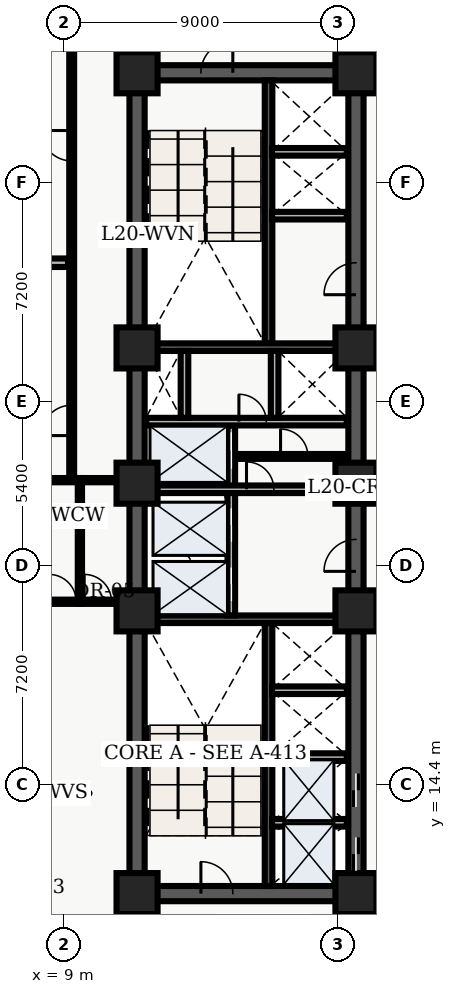
"""IFC4 building model, lengths in metres.
Left out: names, types, materials, properties, quantities, classifications, styles, units other than length and angle.
Written with IfcOpenShell. Run it as: python <this file> out.ifc"""

import sys

from ifc_helpers import new_model, entity, si_unit, converted_unit, direction, frame, origin_with_axes, origin_2d_with_axis, place, context, subcontext, project, spatial, polyline, rectangle, outline, extrude, element, fill, save


model = new_model("IFC4")
c1 = context("Model", 3, precision=1e-05, world=origin_with_axes(), true_north=direction((0.0, 1.0)))
c2 = subcontext(c1, "Body", "Model", "MODEL_VIEW")
j1 = project(units=[si_unit("LENGTHUNIT", "METRE"), converted_unit("PLANEANGLEUNIT", "DEGREE", entity("IfcPlaneAngleMeasure", 0.017), si_unit("PLANEANGLEUNIT", "RADIAN"), dimensions=[0, 0, 0, 0, 0, 0, 0])], contexts=[c1])
p1 = place(None, origin_with_axes())
s1 = spatial("IfcSite", under=j1, at=p1, CompositionType="ELEMENT")
p2 = place(p1, origin_with_axes())
s2 = spatial("IfcBuilding", under=s1, at=p2, CompositionType="ELEMENT")
p3 = place(p2, frame((0.0, 0.0, 84.6), z_axis=(0.0, 0.0, 1.0), x_axis=(1.0, 0.0, 0.0)))
s3 = spatial("IfcBuildingStorey", under=s2, at=p3, CompositionType="ELEMENT", Elevation=84.6)
p4 = place(p3, frame((11.4, 10.8, 0.0), z_axis=(0.0, 0.0, 1.0), x_axis=(0.0, 1.0, 0.0)))
e1 = element("IfcWall", 1, at=p4, inside=s3, PredefinedType="SHEAR", context=c2, shape_type="SweptSolid", body=[
    extrude(outline(polyline([(0.0, -0.25), (27.0, -0.25), (27.0, 0.25), (0.0, 0.25), (0.0, -0.25)])), origin_with_axes(), (0.0, 0.0, 1.0), 4.26),
])
p5 = place(p3, frame((11.4, 10.8, 0.0), z_axis=(0.0, 0.0, 1.0), x_axis=(1.0, 0.0, 0.0)))
e2 = element("IfcWall", 2, at=p5, inside=s3, PredefinedType="SHEAR", context=c2, shape_type="SweptSolid", body=[
    extrude(outline(polyline([(0.0, -0.25), (7.2, -0.25), (7.2, 0.25), (0.0, 0.25), (0.0, -0.25)])), origin_with_axes(), (0.0, 0.0, 1.0), 4.26),
])
p6 = place(p5, frame((2.625, 0.0, 0.0), z_axis=(0.0, 0.0, 1.0), x_axis=(1.0, 0.0, 0.0)))
e3 = element("IfcOpeningElement", 3, at=p6, cuts=e2, PredefinedType="OPENING", context=c2, shape_type="SweptSolid", body=[
    extrude(rectangle(XDim=1.05, YDim=0.52, at=origin_2d_with_axis()), origin_with_axes(), (0.0, 0.0, 1.0), 2.15),
])
p7 = place(p3, frame((11.4, 37.8, 0.0), z_axis=(0.0, 0.0, 1.0), x_axis=(1.0, 0.0, 0.0)))
e4 = element("IfcWall", 4, at=p7, inside=s3, PredefinedType="SHEAR", context=c2, shape_type="SweptSolid", body=[
    extrude(outline(polyline([(0.0, -0.25), (7.2, -0.25), (7.2, 0.25), (0.0, 0.25), (0.0, -0.25)])), origin_with_axes(), (0.0, 0.0, 1.0), 4.26),
])
p8 = place(p7, frame((2.625, 0.0, 0.0), z_axis=(0.0, 0.0, 1.0), x_axis=(1.0, 0.0, 0.0)))
e5 = element("IfcOpeningElement", 5, at=p8, cuts=e4, PredefinedType="OPENING", context=c2, shape_type="SweptSolid", body=[
    extrude(rectangle(XDim=1.05, YDim=0.52, at=origin_2d_with_axis()), origin_with_axes(), (0.0, 0.0, 1.0), 2.15),
])
p9 = place(p3, frame((18.6, 10.8, 0.0), z_axis=(0.0, 0.0, 1.0), x_axis=(0.0, 1.0, 0.0)))
e6 = element("IfcWall", 6, at=p9, inside=s3, PredefinedType="SHEAR", context=c2, shape_type="SweptSolid", body=[
    extrude(outline(polyline([(0.0, -0.25), (13.5, -0.25), (13.5, 0.25), (0.0, 0.25), (0.0, -0.25)])), origin_with_axes(), (0.0, 0.0, 1.0), 4.26),
])
p10 = place(p9, frame((1.3, 0.0, 0.0), z_axis=(0.0, 0.0, 1.0), x_axis=(1.0, 0.0, 0.0)))
e7 = element("IfcOpeningElement", 7, at=p10, cuts=e6, PredefinedType="OPENING", context=c2, shape_type="SweptSolid", body=[
    extrude(rectangle(XDim=1.1, YDim=0.52, at=origin_2d_with_axis()), origin_with_axes(), (0.0, 0.0, 1.0), 2.15),
])
p11 = place(p9, frame((3.4, 0.0, 0.0), z_axis=(0.0, 0.0, 1.0), x_axis=(1.0, 0.0, 0.0)))
e8 = element("IfcOpeningElement", 8, at=p11, cuts=e6, PredefinedType="OPENING", context=c2, shape_type="SweptSolid", body=[
    extrude(rectangle(XDim=1.1, YDim=0.52, at=origin_2d_with_axis()), origin_with_axes(), (0.0, 0.0, 1.0), 2.15),
])
p12 = place(p9, frame((11.125, 0.0, 0.0), z_axis=(0.0, 0.0, 1.0), x_axis=(1.0, 0.0, 0.0)))
e9 = element("IfcOpeningElement", 9, at=p12, cuts=e6, PredefinedType="OPENING", context=c2, shape_type="SweptSolid", body=[
    extrude(rectangle(XDim=1.05, YDim=0.52, at=origin_2d_with_axis()), origin_with_axes(), (0.0, 0.0, 1.0), 2.15),
])
p13 = place(p3, frame((18.6, 24.3, 0.0), z_axis=(0.0, 0.0, 1.0), x_axis=(0.0, 1.0, 0.0)))
e10 = element("IfcWall", 10, at=p13, inside=s3, PredefinedType="SHEAR", context=c2, shape_type="SweptSolid", body=[
    extrude(outline(polyline([(0.0, -0.25), (13.5, -0.25), (13.5, 0.25), (0.0, 0.25), (0.0, -0.25)])), origin_with_axes(), (0.0, 0.0, 1.0), 4.26),
])
p14 = place(p13, frame((6.725, 0.0, 0.0), z_axis=(0.0, 0.0, 1.0), x_axis=(1.0, 0.0, 0.0)))
e11 = element("IfcOpeningElement", 11, at=p14, cuts=e10, PredefinedType="OPENING", context=c2, shape_type="SweptSolid", body=[
    extrude(rectangle(XDim=1.05, YDim=0.52, at=origin_2d_with_axis()), origin_with_axes(), (0.0, 0.0, 1.0), 2.15),
])
p15 = place(p3, frame((15.725, 11.05, 0.0), z_axis=(0.0, 0.0, 1.0), x_axis=(0.0, 1.0, 0.0)))
e12 = element("IfcWall", 12, at=p15, inside=s3, PredefinedType="SHEAR", context=c2, shape_type="SweptSolid", body=[
    extrude(outline(polyline([(0.0, -0.125), (8.65, -0.125), (8.65, 0.125), (0.0, 0.125), (0.0, -0.125)])), origin_with_axes(), (0.0, 0.0, 1.0), 4.26),
])
p16 = place(p3, frame((11.65, 19.825, 0.0), z_axis=(0.0, 0.0, 1.0), x_axis=(1.0, 0.0, 0.0)))
e13 = element("IfcWall", 13, at=p16, inside=s3, PredefinedType="SHEAR", context=c2, shape_type="SweptSolid", body=[
    extrude(outline(polyline([(0.0, -0.125), (6.7, -0.125), (6.7, 0.125), (0.0, 0.125), (0.0, -0.125)])), origin_with_axes(), (0.0, 0.0, 1.0), 4.26),
])
p17 = place(p3, frame((15.725, 28.9, 0.0), z_axis=(0.0, 0.0, 1.0), x_axis=(0.0, 1.0, 0.0)))
e14 = element("IfcWall", 14, at=p17, inside=s3, PredefinedType="SHEAR", context=c2, shape_type="SweptSolid", body=[
    extrude(outline(polyline([(0.0, -0.125), (8.65, -0.125), (8.65, 0.125), (0.0, 0.125), (0.0, -0.125)])), origin_with_axes(), (0.0, 0.0, 1.0), 4.26),
])
p18 = place(p3, frame((11.65, 28.775, 0.0), z_axis=(0.0, 0.0, 1.0), x_axis=(1.0, 0.0, 0.0)))
e15 = element("IfcWall", 15, at=p18, inside=s3, PredefinedType="SHEAR", context=c2, shape_type="SweptSolid", body=[
    extrude(outline(polyline([(0.0, -0.125), (6.7, -0.125), (6.7, 0.125), (0.0, 0.125), (0.0, -0.125)])), origin_with_axes(), (0.0, 0.0, 1.0), 4.26),
])
p19 = place(p3, frame((14.5, 19.95, 0.0), z_axis=(0.0, 0.0, 1.0), x_axis=(0.0, 1.0, 0.0)))
e16 = element("IfcWall", 16, at=p19, inside=s3, PredefinedType="SOLIDWALL", context=c2, shape_type="SweptSolid", body=[
    extrude(outline(polyline([(0.0, -0.125), (6.25, -0.125), (6.25, 0.125), (0.0, 0.125), (0.0, -0.125)])), origin_with_axes(), (0.0, 0.0, 1.0), 3.3),
])
p20 = place(p19, frame((1.025, 0.0, 0.0), z_axis=(0.0, 0.0, 1.0), x_axis=(1.0, 0.0, 0.0)))
e17 = element("IfcOpeningElement", 17, at=p20, cuts=e16, PredefinedType="OPENING", context=c2, shape_type="SweptSolid", body=[
    extrude(rectangle(XDim=1.1, YDim=0.27, at=origin_2d_with_axis()), origin_with_axes(), (0.0, 0.0, 1.0), 2.15),
])
p21 = place(p19, frame((2.975, 0.0, 0.0), z_axis=(0.0, 0.0, 1.0), x_axis=(1.0, 0.0, 0.0)))
e18 = element("IfcOpeningElement", 18, at=p21, cuts=e16, PredefinedType="OPENING", context=c2, shape_type="SweptSolid", body=[
    extrude(rectangle(XDim=1.1, YDim=0.27, at=origin_2d_with_axis()), origin_with_axes(), (0.0, 0.0, 1.0), 2.15),
])
p22 = place(p19, frame((5.425, 0.0, 0.0), z_axis=(0.0, 0.0, 1.0), x_axis=(1.0, 0.0, 0.0)))
e19 = element("IfcOpeningElement", 19, at=p22, cuts=e16, PredefinedType="OPENING", context=c2, shape_type="SweptSolid", body=[
    extrude(rectangle(XDim=1.2, YDim=0.27, at=origin_2d_with_axis()), origin_with_axes(), (0.0, 0.0, 1.0), 2.15),
])
p23 = place(p3, frame((11.7, 24.1, 0.0), z_axis=(0.0, 0.0, 1.0), x_axis=(1.0, 0.0, 0.0)))
e20 = element("IfcWall", 20, at=p23, inside=s3, PredefinedType="SOLIDWALL", context=c2, shape_type="SweptSolid", body=[
    extrude(outline(polyline([(0.0, -0.125), (6.6, -0.125), (6.6, 0.125), (0.0, 0.125), (0.0, -0.125)])), origin_with_axes(), (0.0, 0.0, 1.0), 3.3),
])
p24 = place(p23, frame((3.75, 0.0, 0.0), z_axis=(0.0, 0.0, 1.0), x_axis=(1.0, 0.0, 0.0)))
e21 = element("IfcOpeningElement", 21, at=p24, cuts=e20, PredefinedType="OPENING", context=c2, shape_type="SweptSolid", body=[
    extrude(rectangle(XDim=0.9, YDim=0.27, at=origin_2d_with_axis()), origin_with_axes(), (0.0, 0.0, 1.0), 2.15),
])
p25 = place(p3, frame((11.7, 26.325, 0.0), z_axis=(0.0, 0.0, 1.0), x_axis=(1.0, 0.0, 0.0)))
e22 = element("IfcWall", 22, at=p25, inside=s3, PredefinedType="SOLIDWALL", context=c2, shape_type="SweptSolid", body=[
    extrude(outline(polyline([(0.0, -0.125), (6.6, -0.125), (6.6, 0.125), (0.0, 0.125), (0.0, -0.125)])), origin_with_axes(), (0.0, 0.0, 1.0), 3.3),
])
p26 = place(p25, frame((3.5, 0.0, 0.0), z_axis=(0.0, 0.0, 1.0), x_axis=(1.0, 0.0, 0.0)))
e23 = element("IfcOpeningElement", 23, at=p26, cuts=e22, PredefinedType="OPENING", context=c2, shape_type="SweptSolid", body=[
    extrude(rectangle(XDim=0.9, YDim=0.27, at=origin_2d_with_axis()), origin_with_axes(), (0.0, 0.0, 1.0), 2.15),
])
for number, where, z_axis, x_axis in (
    (24, (12.96, 26.45, 0.0), (0.0, 0.0, 1.0), (0.0, 1.0, 0.0)),
    (25, (15.925, 26.45, 0.0), (0.0, 0.0, 1.0), (0.0, 1.0, 0.0)),
):
    element("IfcWall", number, at=place(p3, frame(where, z_axis=z_axis, x_axis=x_axis)), inside=s3, PredefinedType="SOLIDWALL", context=c2, shape_type="SweptSolid", body=[
        extrude(outline(polyline([(0.0, -0.125), (2.2, -0.125), (2.2, 0.125), (0.0, 0.125), (0.0, -0.125)])), origin_with_axes(), (0.0, 0.0, 1.0), 3.3),
    ])
for number, where, z_axis, x_axis in (
    (26, (11.4, 10.8, 0.0), (0.0, 0.0, 1.0), (1.0, 0.0, 0.0)),
    (27, (11.4, 20.1, 0.0), (0.0, 0.0, 1.0), (1.0, 0.0, 0.0)),
    (28, (11.4, 24.3, 0.0), (0.0, 0.0, 1.0), (1.0, 0.0, 0.0)),
    (29, (11.4, 28.75, 0.0), (0.0, 0.0, 1.0), (1.0, 0.0, 0.0)),
    (30, (11.4, 37.8, 0.0), (0.0, 0.0, 1.0), (1.0, 0.0, 0.0)),
    (31, (18.6, 10.8, 0.0), (0.0, 0.0, 1.0), (1.0, 0.0, 0.0)),
    (32, (18.6, 20.1, 0.0), (0.0, 0.0, 1.0), (1.0, 0.0, 0.0)),
    (33, (18.6, 24.3, 0.0), (0.0, 0.0, 1.0), (1.0, 0.0, 0.0)),
    (34, (18.6, 28.75, 0.0), (0.0, 0.0, 1.0), (1.0, 0.0, 0.0)),
    (35, (18.6, 37.8, 0.0), (0.0, 0.0, 1.0), (1.0, 0.0, 0.0)),
):
    element("IfcColumn", number, at=place(p3, frame(where, z_axis=z_axis, x_axis=x_axis)), inside=s3, PredefinedType="COLUMN", context=c2, shape_type="SweptSolid", body=[
        extrude(rectangle(XDim=1.35, YDim=1.35, at=origin_2d_with_axis()), origin_with_axes(), (0.0, 0.0, 1.0), 4.5),
    ])
p27 = place(p3, frame((14.62, 25.18, 0.0), z_axis=(0.0, 0.0, 1.0), x_axis=(1.0, 0.0, 0.0)))
e36 = element("IfcWall", 36, at=p27, inside=s3, PredefinedType="PARTITIONING", context=c2, shape_type="SweptSolid", body=[
    extrude(outline(polyline([(0.0, -0.08), (3.68, -0.08), (3.68, 0.08), (0.0, 0.08), (0.0, -0.08)])), origin_with_axes(), (0.0, 0.0, 1.0), 3.2),
])
p28 = place(p27, frame((1.95, 0.0, 0.0), z_axis=(0.0, 0.0, 1.0), x_axis=(1.0, 0.0, 0.0)))
e37 = element("IfcOpeningElement", 37, at=p28, cuts=e36, PredefinedType="OPENING", context=c2, shape_type="SweptSolid", body=[
    extrude(rectangle(XDim=0.9, YDim=0.18, at=origin_2d_with_axis()), origin_with_axes(), (0.0, 0.0, 1.0), 2.15),
])
for number, where, z_axis, x_axis in (
    (38, (15.84, 13.13, 0.0), (0.0, 0.0, 1.0), (1.0, 0.0, 0.0)),
    (39, (15.84, 15.29, 0.0), (0.0, 0.0, 1.0), (1.0, 0.0, 0.0)),
    (40, (15.84, 17.49, 0.0), (0.0, 0.0, 1.0), (1.0, 0.0, 0.0)),
    (41, (15.84, 33.1, 0.0), (0.0, 0.0, 1.0), (1.0, 0.0, 0.0)),
    (42, (15.84, 35.2, 0.0), (0.0, 0.0, 1.0), (1.0, 0.0, 0.0)),
):
    element("IfcWall", number, at=place(p3, frame(where, z_axis=z_axis, x_axis=x_axis)), inside=s3, PredefinedType="SOLIDWALL", context=c2, shape_type="SweptSolid", body=[
        extrude(outline(polyline([(0.0, -0.125), (2.46, -0.125), (2.46, 0.125), (0.0, 0.125), (0.0, -0.125)])), origin_with_axes(), (0.0, 0.0, 1.0), 3.2),
    ])
p29 = place(p3, frame((9.52, 20.4, 0.0), z_axis=(0.0, 0.0, 1.0), x_axis=(0.0, 1.0, 0.0)))
e43 = element("IfcWall", 43, at=p29, inside=s3, PredefinedType="PARTITIONING", context=c2, shape_type="SweptSolid", body=[
    extrude(outline(polyline([(0.0, -0.07), (4.0, -0.07), (4.0, 0.07), (0.0, 0.07), (0.0, -0.07)])), origin_with_axes(), (0.0, 0.0, 1.0), 3.2),
])
p30 = place(p3, frame((9.52, 20.4, 0.0), z_axis=(0.0, 0.0, 1.0), x_axis=(1.0, 0.0, 0.0)))
e44 = element("IfcWall", 44, at=p30, inside=s3, PredefinedType="PARTITIONING", context=c2, shape_type="SweptSolid", body=[
    extrude(outline(polyline([(0.0, -0.07), (1.58, -0.07), (1.58, 0.07), (0.0, 0.07), (0.0, -0.07)])), origin_with_axes(), (0.0, 0.0, 1.0), 3.2),
])
p31 = place(p30, frame((0.59, 0.0, 0.0), z_axis=(0.0, 0.0, 1.0), x_axis=(1.0, 0.0, 0.0)))
e45 = element("IfcOpeningElement", 45, at=p31, cuts=e44, PredefinedType="OPENING", context=c2, shape_type="SweptSolid", body=[
    extrude(rectangle(XDim=0.9, YDim=0.16, at=origin_2d_with_axis()), origin_with_axes(), (0.0, 0.0, 1.0), 2.15),
])
p32 = place(p3, frame((9.52, 24.4, 0.0), z_axis=(0.0, 0.0, 1.0), x_axis=(1.0, 0.0, 0.0)))
e46 = element("IfcWall", 46, at=p32, inside=s3, PredefinedType="PARTITIONING", context=c2, shape_type="SweptSolid", body=[
    extrude(outline(polyline([(0.0, -0.07), (1.58, -0.07), (1.58, 0.07), (0.0, 0.07), (0.0, -0.07)])), origin_with_axes(), (0.0, 0.0, 1.0), 3.2),
])
p33 = place(p3, frame((9.25, 24.4, 0.0), z_axis=(0.0, 0.0, 1.0), x_axis=(0.0, 1.0, 0.0)))
e47 = element("IfcWall", 47, at=p33, inside=s3, PredefinedType="PARTITIONING", context=c2, shape_type="SweptSolid", body=[
    extrude(outline(polyline([(0.0, -0.08), (16.1, -0.08), (16.1, 0.08), (0.0, 0.08), (0.0, -0.08)])), origin_with_axes(), (0.0, 0.0, 1.0), 3.2),
])
p34 = place(p33, frame((1.966, 0.0, 0.0), z_axis=(0.0, 0.0, 1.0), x_axis=(1.0, 0.0, 0.0)))
e48 = element("IfcOpeningElement", 48, at=p34, cuts=e47, PredefinedType="OPENING", context=c2, shape_type="SweptSolid", body=[
    extrude(rectangle(XDim=1.0, YDim=0.18, at=origin_2d_with_axis()), origin_with_axes(), (0.0, 0.0, 1.0), 2.15),
])
p35 = place(p33, frame((11.001, 0.0, 0.0), z_axis=(0.0, 0.0, 1.0), x_axis=(1.0, 0.0, 0.0)))
e49 = element("IfcOpeningElement", 49, at=p35, cuts=e47, PredefinedType="OPENING", context=c2, shape_type="SweptSolid", body=[
    extrude(rectangle(XDim=1.0, YDim=0.18, at=origin_2d_with_axis()), origin_with_axes(), (0.0, 0.0, 1.0), 2.15),
])
p36 = place(p3, frame((0.36, 20.4, 0.0), z_axis=(0.0, 0.0, 1.0), x_axis=(1.0, 0.0, 0.0)))
e50 = element("IfcWall", 50, at=p36, inside=s3, PredefinedType="PARTITIONING", context=c2, shape_type="SweptSolid", body=[
    extrude(outline(polyline([(0.0, -0.07), (9.16, -0.07), (9.16, 0.07), (0.0, 0.07), (0.0, -0.07)])), origin_with_axes(), (0.0, 0.0, 1.0), 3.2),
])
p37 = place(p36, frame((8.59, 0.0, 0.0), z_axis=(0.0, 0.0, 1.0), x_axis=(1.0, 0.0, 0.0)))
e51 = element("IfcOpeningElement", 51, at=p37, cuts=e50, PredefinedType="OPENING", context=c2, shape_type="SweptSolid", body=[
    extrude(rectangle(XDim=0.9, YDim=0.16, at=origin_2d_with_axis()), origin_with_axes(), (0.0, 0.0, 1.0), 2.15),
])
p38 = place(p3, frame((0.36, 24.4, 0.0), z_axis=(0.0, 0.0, 1.0), x_axis=(1.0, 0.0, 0.0)))
e52 = element("IfcWall", 52, at=p38, inside=s3, PredefinedType="PARTITIONING", context=c2, shape_type="SweptSolid", body=[
    extrude(outline(polyline([(0.0, -0.07), (9.16, -0.07), (9.16, 0.07), (0.0, 0.07), (0.0, -0.07)])), origin_with_axes(), (0.0, 0.0, 1.0), 3.2),
])
p39 = place(p3, frame((0.375, 31.552, 0.0), z_axis=(0.0, 0.0, 1.0), x_axis=(1.0, 0.0, 0.0)))
e53 = element("IfcWall", 53, at=p39, inside=s3, PredefinedType="PARTITIONING", context=c2, shape_type="SweptSolid", body=[
    extrude(outline(polyline([(0.0, -0.14), (8.755, -0.14), (8.755, 0.14), (0.0, 0.14), (0.0, -0.14)])), origin_with_axes(), (0.0, 0.0, 1.0), 3.2),
])
p40 = place(p9, frame((1.3, 0.0, 0.0), z_axis=(0.0, 0.0, 1.0), x_axis=(1.0, 0.0, 0.0)))
e54 = element("IfcDoor", 54, at=p40, inside=s3, OperationType="SLIDING_TO_LEFT", PredefinedType="DOOR", context=c2, shape_type="SweptSolid", body=[
    extrude(rectangle(XDim=1.1, YDim=0.09, at=origin_2d_with_axis()), origin_with_axes(), (0.0, 0.0, 1.0), 2.15),
])
fill(e7, e54)
p41 = place(p9, frame((3.4, 0.0, 0.0), z_axis=(0.0, 0.0, 1.0), x_axis=(1.0, 0.0, 0.0)))
e55 = element("IfcDoor", 55, at=p41, inside=s3, OperationType="SLIDING_TO_RIGHT", PredefinedType="DOOR", context=c2, shape_type="SweptSolid", body=[
    extrude(rectangle(XDim=1.1, YDim=0.09, at=origin_2d_with_axis()), origin_with_axes(), (0.0, 0.0, 1.0), 2.15),
])
fill(e8, e55)
p42 = place(p19, frame((1.025, 0.0, 0.0), z_axis=(0.0, 0.0, 1.0), x_axis=(1.0, 0.0, 0.0)))
e56 = element("IfcDoor", 56, at=p42, inside=s3, OperationType="SLIDING_TO_LEFT", PredefinedType="DOOR", context=c2, shape_type="SweptSolid", body=[
    extrude(rectangle(XDim=1.1, YDim=0.09, at=origin_2d_with_axis()), origin_with_axes(), (0.0, 0.0, 1.0), 2.15),
])
fill(e17, e56)
p43 = place(p19, frame((2.975, 0.0, 0.0), z_axis=(0.0, 0.0, 1.0), x_axis=(1.0, 0.0, 0.0)))
e57 = element("IfcDoor", 57, at=p43, inside=s3, OperationType="SLIDING_TO_RIGHT", PredefinedType="DOOR", context=c2, shape_type="SweptSolid", body=[
    extrude(rectangle(XDim=1.1, YDim=0.09, at=origin_2d_with_axis()), origin_with_axes(), (0.0, 0.0, 1.0), 2.15),
])
fill(e18, e57)
p44 = place(p19, frame((5.425, 0.0, 0.0), z_axis=(0.0, 0.0, 1.0), x_axis=(1.0, 0.0, 0.0)))
e58 = element("IfcDoor", 58, at=p44, inside=s3, OperationType="DOUBLE_DOOR_SLIDING", PredefinedType="DOOR", context=c2, shape_type="SweptSolid", body=[
    extrude(rectangle(XDim=1.2, YDim=0.09, at=origin_2d_with_axis()), origin_with_axes(), (0.0, 0.0, 1.0), 2.15),
])
fill(e19, e58)
p45 = place(p5, frame((2.625, 0.0, 0.0), z_axis=(0.0, 0.0, 1.0), x_axis=(1.0, 0.0, 0.0)))
e59 = element("IfcDoor", 59, at=p45, inside=s3, OperationType="SINGLE_SWING_LEFT", PredefinedType="DOOR", context=c2, shape_type="SweptSolid", body=[
    extrude(rectangle(XDim=1.05, YDim=0.09, at=origin_2d_with_axis()), origin_with_axes(), (0.0, 0.0, 1.0), 2.15),
])
fill(e3, e59)
p46 = place(p7, frame((2.625, 0.0, 0.0), z_axis=(0.0, 0.0, 1.0), x_axis=(1.0, 0.0, 0.0)))
e60 = element("IfcDoor", 60, at=p46, inside=s3, OperationType="SINGLE_SWING_RIGHT", PredefinedType="DOOR", context=c2, shape_type="SweptSolid", body=[
    extrude(rectangle(XDim=1.05, YDim=0.09, at=origin_2d_with_axis()), origin_with_axes(), (0.0, 0.0, 1.0), 2.15),
])
fill(e5, e60)
p47 = place(p9, frame((11.125, 0.0, 0.0), z_axis=(0.0, 0.0, 1.0), x_axis=(1.0, 0.0, 0.0)))
e61 = element("IfcDoor", 61, at=p47, inside=s3, OperationType="SINGLE_SWING_LEFT", PredefinedType="DOOR", context=c2, shape_type="SweptSolid", body=[
    extrude(rectangle(XDim=1.05, YDim=0.09, at=origin_2d_with_axis()), origin_with_axes(), (0.0, 0.0, 1.0), 2.15),
])
fill(e9, e61)
p48 = place(p25, frame((3.5, 0.0, 0.0), z_axis=(0.0, 0.0, 1.0), x_axis=(1.0, 0.0, 0.0)))
e62 = element("IfcDoor", 62, at=p48, inside=s3, OperationType="SINGLE_SWING_LEFT", PredefinedType="DOOR", context=c2, shape_type="SweptSolid", body=[
    extrude(rectangle(XDim=0.9, YDim=0.09, at=origin_2d_with_axis()), origin_with_axes(), (0.0, 0.0, 1.0), 2.15),
])
fill(e23, e62)
p49 = place(p23, frame((3.75, 0.0, 0.0), z_axis=(0.0, 0.0, 1.0), x_axis=(1.0, 0.0, 0.0)))
e63 = element("IfcDoor", 63, at=p49, inside=s3, OperationType="SINGLE_SWING_LEFT", PredefinedType="DOOR", context=c2, shape_type="SweptSolid", body=[
    extrude(rectangle(XDim=0.9, YDim=0.09, at=origin_2d_with_axis()), origin_with_axes(), (0.0, 0.0, 1.0), 2.15),
])
fill(e21, e63)
p50 = place(p27, frame((1.95, 0.0, 0.0), z_axis=(0.0, 0.0, 1.0), x_axis=(1.0, 0.0, 0.0)))
e64 = element("IfcDoor", 64, at=p50, inside=s3, OperationType="SINGLE_SWING_LEFT", PredefinedType="DOOR", context=c2, shape_type="SweptSolid", body=[
    extrude(rectangle(XDim=0.9, YDim=0.09, at=origin_2d_with_axis()), origin_with_axes(), (0.0, 0.0, 1.0), 2.15),
])
fill(e37, e64)
p51 = place(p13, frame((6.725, 0.0, 0.0), z_axis=(0.0, 0.0, 1.0), x_axis=(1.0, 0.0, 0.0)))
e65 = element("IfcDoor", 65, at=p51, inside=s3, OperationType="SINGLE_SWING_LEFT", PredefinedType="DOOR", context=c2, shape_type="SweptSolid", body=[
    extrude(rectangle(XDim=1.05, YDim=0.09, at=origin_2d_with_axis()), origin_with_axes(), (0.0, 0.0, 1.0), 2.15),
])
fill(e11, e65)
p52 = place(p30, frame((0.59, 0.0, 0.0), z_axis=(0.0, 0.0, 1.0), x_axis=(1.0, 0.0, 0.0)))
e66 = element("IfcDoor", 66, at=p52, inside=s3, OperationType="SINGLE_SWING_LEFT", PredefinedType="DOOR", context=c2, shape_type="SweptSolid", body=[
    extrude(rectangle(XDim=0.9, YDim=0.084, at=origin_2d_with_axis()), origin_with_axes(), (0.0, 0.0, 1.0), 2.15),
])
fill(e45, e66)
p53 = place(p36, frame((8.59, 0.0, 0.0), z_axis=(0.0, 0.0, 1.0), x_axis=(1.0, 0.0, 0.0)))
e67 = element("IfcDoor", 67, at=p53, inside=s3, OperationType="SINGLE_SWING_LEFT", PredefinedType="DOOR", context=c2, shape_type="SweptSolid", body=[
    extrude(rectangle(XDim=0.9, YDim=0.084, at=origin_2d_with_axis()), origin_with_axes(), (0.0, 0.0, 1.0), 2.15),
])
fill(e51, e67)
p54 = place(p33, frame((1.966, 0.0, 0.0), z_axis=(0.0, 0.0, 1.0), x_axis=(1.0, 0.0, 0.0)))
e68 = element("IfcDoor", 68, at=p54, inside=s3, OperationType="SINGLE_SWING_LEFT", PredefinedType="DOOR", context=c2, shape_type="SweptSolid", body=[
    extrude(rectangle(XDim=1.0, YDim=0.09, at=origin_2d_with_axis()), origin_with_axes(), (0.0, 0.0, 1.0), 2.15),
])
fill(e48, e68)
p55 = place(p33, frame((11.001, 0.0, 0.0), z_axis=(0.0, 0.0, 1.0), x_axis=(1.0, 0.0, 0.0)))
e69 = element("IfcDoor", 69, at=p55, inside=s3, OperationType="SINGLE_SWING_RIGHT", PredefinedType="DOOR", context=c2, shape_type="SweptSolid", body=[
    extrude(rectangle(XDim=1.0, YDim=0.09, at=origin_2d_with_axis()), origin_with_axes(), (0.0, 0.0, 1.0), 2.15),
])
fill(e49, e69)
save(model, sys.argv[1])
